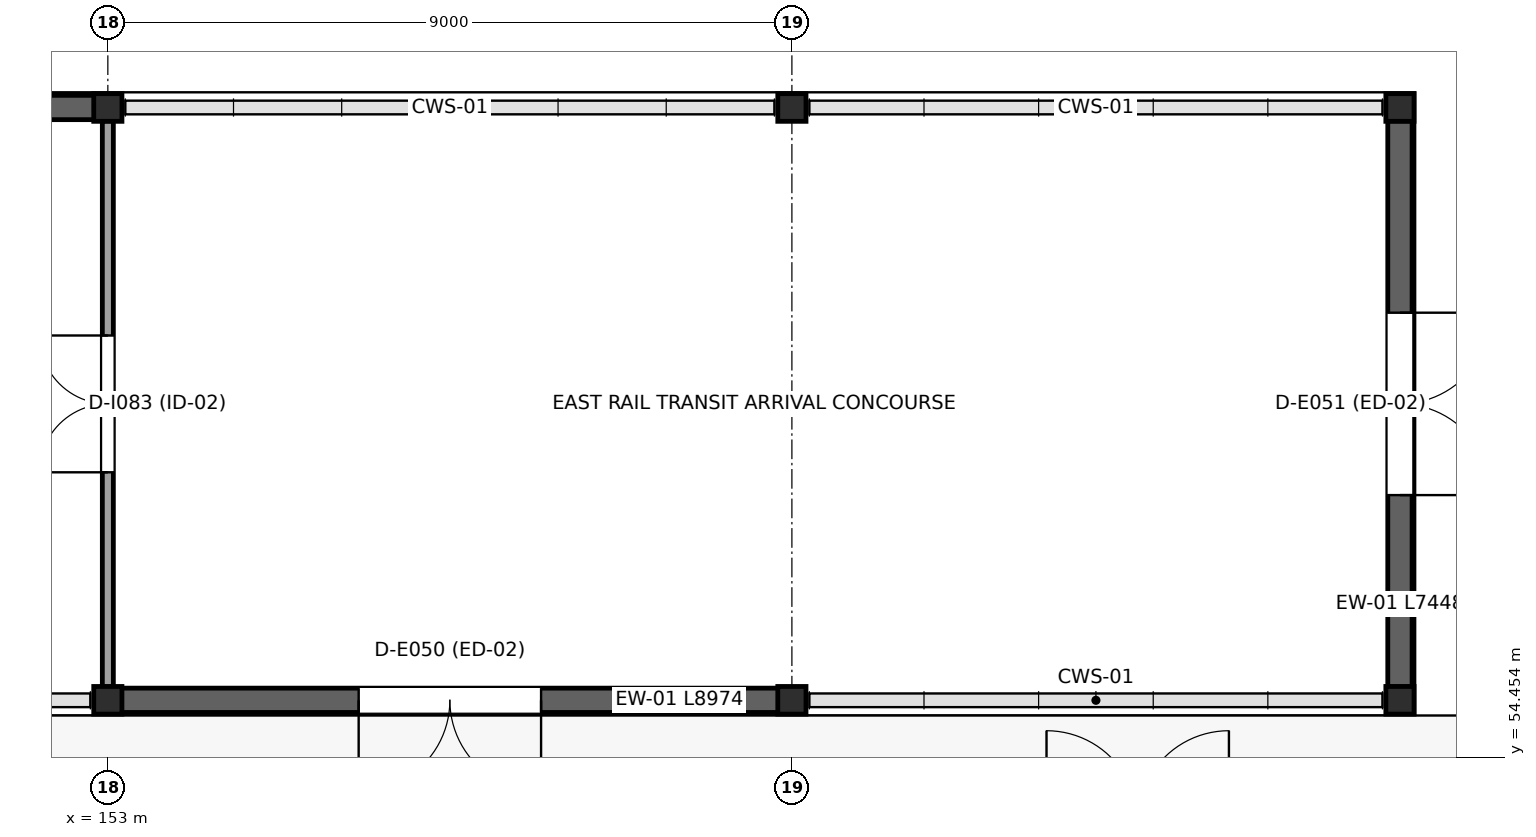
"""IFC4 building model, lengths in metres.
Left out: names, types, materials, properties, quantities, classifications, styles, units other than length and angle.
Written with IfcOpenShell. Run it as: python <this file> out.ifc"""

import sys

from ifc_helpers import new_model, si_unit, direction, frame, frame_2d, origin, origin_2d, place, context, subcontext, project, spatial, rectangle, i_section, extrude, element, fill, save


model = new_model("IFC4")
c1 = context("Model", 3, precision=1e-05, world=origin(), true_north=direction((0.0, 1.0)))
c2 = subcontext(c1, "Body", "Model", "MODEL_VIEW")
j1 = project(units=[si_unit("LENGTHUNIT", "METRE"), si_unit("PLANEANGLEUNIT", "RADIAN")], contexts=[c1])
p1 = place(None, origin())
s1 = spatial("IfcSite", under=j1, at=p1, CompositionType="ELEMENT")
p2 = place(p1, origin())
s2 = spatial("IfcBuilding", under=s1, at=p2, CompositionType="ELEMENT")
p3 = place(p2, origin())
s3 = spatial("IfcBuildingStorey", under=s2, at=p3, CompositionType="ELEMENT", Elevation=0.0)
for number, where, z_axis, x_axis in (
    (1, (153.0, 55.2, 0.0), (0.0, 0.0, 1.0), (1.0, 0.0, 0.0)),
    (2, (153.0, 63.0, 0.0), (0.0, 0.0, 1.0), (1.0, 0.0, 0.0)),
    (3, (162.0, 55.2, 0.0), (0.0, 0.0, 1.0), (1.0, 0.0, 0.0)),
    (4, (162.0, 63.0, 0.0), (0.0, 0.0, 1.0), (1.0, 0.0, 0.0)),
    (5, (170.0, 55.2, 0.0), (0.0, 0.0, 1.0), (1.0, 0.0, 0.0)),
    (6, (170.0, 63.0, 0.0), (0.0, 0.0, 1.0), (1.0, 0.0, 0.0)),
):
    element("IfcColumn", number, at=place(p3, frame(where, z_axis=z_axis, x_axis=x_axis)), inside=s3, PredefinedType="COLUMN", context=c2, shape_type="SweptSolid", body=[
        extrude(i_section(OverallWidth=0.371, OverallDepth=0.364, WebThickness=0.013, FlangeThickness=0.022, at=origin_2d()), origin(), (0.0, 0.0, 1.0), 6.0),
    ])
p4 = place(p3, frame((144.36, 63.0, 0.0), z_axis=(0.0, 0.0, 1.0), x_axis=(1.0, 0.0, 0.0)))
e7 = element("IfcWall", 7, at=p4, inside=s3, PredefinedType="STANDARD", context=c2, shape_type="SweptSolid", body=[
    extrude(rectangle(XDim=8.627, YDim=0.32, at=frame_2d((4.313, 0.0))), origin(), (0.0, 0.0, 1.0), 5.78),
])
p5 = place(p4, frame((0.79, 0.0, 0.0)))
e8 = element("IfcOpeningElement", 8, at=p5, cuts=e7, PredefinedType="OPENING", context=c2, shape_type="SweptSolid", body=[
    extrude(rectangle(XDim=2.4, YDim=2.6, at=frame_2d((1.2, 1.3))), frame((0.0, 0.17, 0.0), z_axis=(0.0, -1.0, 0.0), x_axis=(1.0, 0.0, 0.0)), (0.0, 0.0, 1.0), 0.34),
])
p6 = place(p3, frame((161.987, 55.2, 0.0), z_axis=(0.0, 0.0, 1.0), x_axis=(-1.0, 0.0, 0.0)))
e9 = element("IfcWall", 9, at=p6, inside=s3, PredefinedType="STANDARD", context=c2, shape_type="SweptSolid", body=[
    extrude(rectangle(XDim=8.974, YDim=0.32, at=frame_2d((4.487, 0.0))), origin(), (0.0, 0.0, 1.0), 5.78),
])
p7 = place(p6, frame((3.287, 0.0, 0.0)))
e10 = element("IfcOpeningElement", 10, at=p7, cuts=e9, PredefinedType="OPENING", context=c2, shape_type="SweptSolid", body=[
    extrude(rectangle(XDim=2.4, YDim=2.6, at=frame_2d((1.2, 1.3))), frame((0.0, 0.17, 0.0), z_axis=(0.0, -1.0, 0.0), x_axis=(1.0, 0.0, 0.0)), (0.0, 0.0, 1.0), 0.34),
])
p8 = place(p3, frame((170.0, 62.824, 0.0), z_axis=(0.0, 0.0, 1.0), x_axis=(0.0, -1.0, 0.0)))
e11 = element("IfcWall", 11, at=p8, inside=s3, PredefinedType="STANDARD", context=c2, shape_type="SweptSolid", body=[
    extrude(rectangle(XDim=7.448, YDim=0.32, at=frame_2d((3.724, 0.0))), origin(), (0.0, 0.0, 1.0), 5.84),
])
p9 = place(p8, frame((2.524, 0.0, 0.0)))
e12 = element("IfcOpeningElement", 12, at=p9, cuts=e11, PredefinedType="OPENING", context=c2, shape_type="SweptSolid", body=[
    extrude(rectangle(XDim=2.4, YDim=2.6, at=frame_2d((1.2, 1.3))), frame((0.0, 0.17, 0.0), z_axis=(0.0, -1.0, 0.0), x_axis=(1.0, 0.0, 0.0)), (0.0, 0.0, 1.0), 0.34),
])
p10 = place(p3, frame((153.0, 55.377, 0.0), z_axis=(0.0, 0.0, 1.0), x_axis=(0.0, 1.0, 0.0)))
e13 = element("IfcWall", 13, at=p10, inside=s3, PredefinedType="PARTITIONING", context=c2, shape_type="SweptSolid", body=[
    extrude(rectangle(XDim=7.446, YDim=0.145, at=frame_2d((3.723, 0.0))), origin(), (0.0, 0.0, 1.0), 4.65),
])
p11 = place(p10, frame((2.823, 0.0, 0.0)))
e14 = element("IfcOpeningElement", 14, at=p11, cuts=e13, PredefinedType="OPENING", context=c2, shape_type="SweptSolid", body=[
    extrude(rectangle(XDim=1.8, YDim=2.3, at=frame_2d((0.9, 1.15))), frame((0.0, 0.083, 0.0), z_axis=(0.0, -1.0, 0.0), x_axis=(1.0, 0.0, 0.0)), (0.0, 0.0, 1.0), 0.165),
])
p12 = place(p7, origin())
e15 = element("IfcDoor", 15, at=p12, inside=s3, OperationType="DOUBLE_DOOR_SINGLE_SWING", PredefinedType="DOOR", context=c2, shape_type="SweptSolid", body=[
    extrude(rectangle(XDim=2.4, YDim=2.6, at=frame_2d((1.2, 1.3))), frame((0.0, 0.025, 0.0), z_axis=(0.0, -1.0, 0.0), x_axis=(1.0, 0.0, 0.0)), (0.0, 0.0, 1.0), 0.05),
])
fill(e10, e15)
p13 = place(p9, origin())
e16 = element("IfcDoor", 16, at=p13, inside=s3, OperationType="DOUBLE_DOOR_SINGLE_SWING", PredefinedType="DOOR", context=c2, shape_type="SweptSolid", body=[
    extrude(rectangle(XDim=2.4, YDim=2.6, at=frame_2d((1.2, 1.3))), frame((0.0, 0.025, 0.0), z_axis=(0.0, -1.0, 0.0), x_axis=(1.0, 0.0, 0.0)), (0.0, 0.0, 1.0), 0.05),
])
fill(e12, e16)
p14 = place(p11, origin())
e17 = element("IfcDoor", 17, at=p14, inside=s3, OperationType="DOUBLE_DOOR_SINGLE_SWING", PredefinedType="DOOR", context=c2, shape_type="SweptSolid", body=[
    extrude(rectangle(XDim=1.8, YDim=2.3, at=frame_2d((0.9, 1.15))), frame((0.0, 0.025, 0.0), z_axis=(0.0, -1.0, 0.0), x_axis=(1.0, 0.0, 0.0)), (0.0, 0.0, 1.0), 0.05),
])
fill(e14, e17)
save(model, sys.argv[1])
